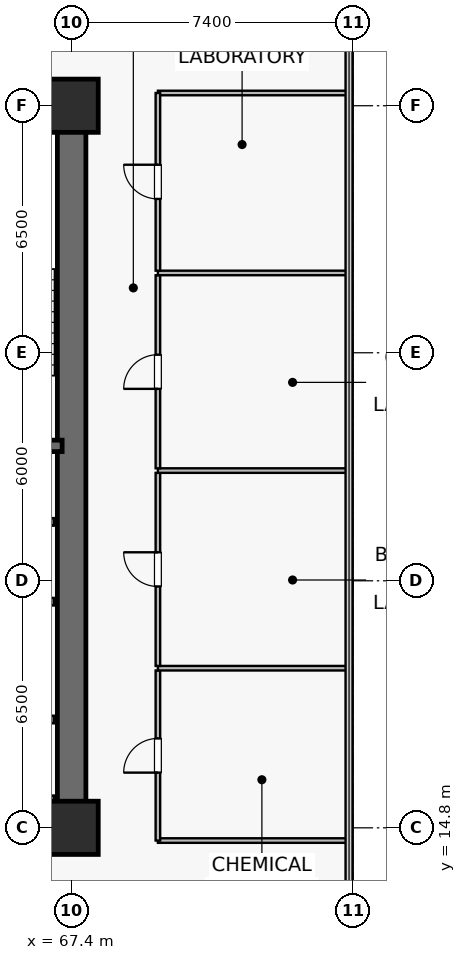
"""IFC4 building model, lengths in metres.
Left out: names, types, materials, properties, quantities, classifications, styles, units other than length and angle.
Written with IfcOpenShell. Run it as: python <this file> out.ifc"""

import sys

from ifc_helpers import new_model, si_unit, direction, frame, frame_2d, origin, origin_2d, place, context, subcontext, project, spatial, rectangle, extrude, source, transform, mapped, element, fill, save


model = new_model("IFC4")
c1 = context("Model", 3, precision=1e-05, world=origin(), true_north=direction((0.0, 1.0)))
c2 = subcontext(c1, "Body", "Model", "MODEL_VIEW")
j1 = project(units=[si_unit("LENGTHUNIT", "METRE"), si_unit("PLANEANGLEUNIT", "RADIAN")], contexts=[c1])
p1 = place(None, origin())
s1 = spatial("IfcSite", under=j1, at=p1, CompositionType="ELEMENT")
p2 = place(p1, origin())
s2 = spatial("IfcBuilding", under=s1, at=p2, CompositionType="ELEMENT")
p3 = place(p2, frame((0.0, 0.0, 62.1)))
s3 = spatial("IfcBuildingStorey", under=s2, at=p3, CompositionType="ELEMENT", Elevation=62.1)
p4 = place(p3, frame((52.225, 14.8, 0.0), z_axis=(0.0, 0.0, 1.0), x_axis=(1.0, 0.0, 0.0)))
e1 = element("IfcWall", 1, at=p4, inside=s3, PredefinedType="SHEAR", context=c2, shape_type="SweptSolid", body=[
    extrude(rectangle(XDim=15.55, YDim=0.75, at=frame_2d((7.775, 0.0))), origin(), (0.0, 0.0, 1.0), 3.78),
])
p5 = place(p3, frame((52.225, 33.8, 0.0), z_axis=(0.0, 0.0, 1.0), x_axis=(1.0, 0.0, 0.0)))
e2 = element("IfcWall", 2, at=p5, inside=s3, PredefinedType="SHEAR", context=c2, shape_type="SweptSolid", body=[
    extrude(rectangle(XDim=15.55, YDim=0.75, at=frame_2d((7.775, 0.0))), origin(), (0.0, 0.0, 1.0), 3.78),
])
p6 = place(p5, frame((8.875, 0.0, 0.0)))
e3 = element("IfcOpeningElement", 3, at=p6, cuts=e2, PredefinedType="OPENING", context=c2, shape_type="SweptSolid", body=[
    extrude(rectangle(XDim=0.95, YDim=2.15, at=frame_2d((0.475, 1.075))), frame((0.0, 0.385, 0.0), z_axis=(0.0, -1.0, 0.0), x_axis=(1.0, 0.0, 0.0)), (0.0, 0.0, 1.0), 0.77),
])
p7 = place(p5, frame((5.51, 0.0, 0.0)))
e4 = element("IfcOpeningElement", 4, at=p7, cuts=e2, PredefinedType="OPENING", context=c2, shape_type="SweptSolid", body=[
    extrude(rectangle(XDim=0.95, YDim=2.15, at=frame_2d((0.475, 1.075))), frame((0.0, 0.385, 0.0), z_axis=(0.0, -1.0, 0.0), x_axis=(1.0, 0.0, 0.0)), (0.0, 0.0, 1.0), 0.77),
])
p8 = place(p5, frame((2.11, 0.0, 0.0)))
e5 = element("IfcOpeningElement", 5, at=p8, cuts=e2, PredefinedType="OPENING", context=c2, shape_type="SweptSolid", body=[
    extrude(rectangle(XDim=0.95, YDim=2.15, at=frame_2d((0.475, 1.075))), frame((0.0, 0.385, 0.0), z_axis=(0.0, -1.0, 0.0), x_axis=(1.0, 0.0, 0.0)), (0.0, 0.0, 1.0), 0.77),
])
p9 = place(p3, frame((67.4, 15.175, 0.0), z_axis=(0.0, 0.0, 1.0), x_axis=(0.0, 1.0, 0.0)))
e6 = element("IfcWall", 6, at=p9, inside=s3, PredefinedType="SHEAR", context=c2, shape_type="SweptSolid", body=[
    extrude(rectangle(XDim=18.25, YDim=0.75, at=frame_2d((9.125, 0.0))), origin(), (0.0, 0.0, 1.0), 3.78),
])
p10 = place(p3, frame((63.35, 24.85, 0.0), z_axis=(0.0, 0.0, 1.0), x_axis=(1.0, 0.0, 0.0)))
e7 = element("IfcWall", 7, at=p10, inside=s3, PredefinedType="SHEAR", context=c2, shape_type="SweptSolid", body=[
    extrude(rectangle(XDim=3.8, YDim=0.3, at=frame_2d((1.9, 0.0))), origin(), (0.0, 0.0, 1.0), 3.78),
])
p11 = place(p3, frame((63.35, 33.4, 0.0), z_axis=(0.0, 0.0, 1.0), x_axis=(1.0, 0.0, 0.0)))
e8 = element("IfcWall", 8, at=p11, inside=s3, PredefinedType="SOLIDWALL", context=c2, shape_type="SweptSolid", body=[
    extrude(rectangle(XDim=3.72, YDim=0.12, at=frame_2d((1.86, 0.0))), origin(), (0.0, 0.0, 1.0), 3.78),
])
m1 = source(origin(), c2, "Body", "SweptSolid", [
    extrude(rectangle(XDim=1.4, YDim=1.4, at=origin_2d()), origin(), (0.0, 0.0, 1.0), 4.1),
])
for number, where, z_axis, x_axis in (
    (9, (67.4, 14.8, 0.0), (0.0, 0.0, 1.0), (1.0, 0.0, 0.0)),
    (10, (67.4, 33.8, 0.0), (0.0, 0.0, 1.0), (1.0, 0.0, 0.0)),
):
    element("IfcColumn", number, at=place(p3, frame(where, z_axis=z_axis, x_axis=x_axis)), inside=s3, PredefinedType="COLUMN", context=c2, shape_type="MappedRepresentation", body=[
        mapped(m1, transform((0.0, 0.0, 0.0), scale=1.0)),
    ])
p12 = place(p3, frame((64.67, 17.65, 0.0), z_axis=(0.0, 0.0, 1.0), x_axis=(1.0, 0.0, 0.0)))
e11 = element("IfcWall", 11, at=p12, inside=s3, PredefinedType="SOLIDWALL", context=c2, shape_type="SweptSolid", body=[
    extrude(rectangle(XDim=2.26, YDim=0.2, at=frame_2d((1.13, 0.0))), origin(), (0.0, 0.0, 1.0), 3.78),
])
p13 = place(p12, frame((0.58, 0.0, 0.0)))
e12 = element("IfcOpeningElement", 12, at=p13, cuts=e11, PredefinedType="OPENING", context=c2, shape_type="SweptSolid", body=[
    extrude(rectangle(XDim=1.1, YDim=2.22, at=frame_2d((0.55, 1.11))), frame((0.0, 0.11, 0.0), z_axis=(0.0, -1.0, 0.0), x_axis=(1.0, 0.0, 0.0)), (0.0, 0.0, 1.0), 0.22),
])
for number, where, z_axis, x_axis in (
    (13, (64.67, 15.55, 0.0), (0.0, 0.0, 1.0), (1.0, 0.0, 0.0)),
    (14, (64.67, 20.75, 0.0), (0.0, 0.0, 1.0), (1.0, 0.0, 0.0)),
    (15, (64.67, 22.85, 0.0), (0.0, 0.0, 1.0), (1.0, 0.0, 0.0)),
):
    element("IfcWall", number, at=place(p3, frame(where, z_axis=z_axis, x_axis=x_axis)), inside=s3, PredefinedType="SOLIDWALL", context=c2, shape_type="SweptSolid", body=[
        extrude(rectangle(XDim=2.26, YDim=0.2, at=frame_2d((1.13, 0.0))), origin(), (0.0, 0.0, 1.0), 3.78),
    ])
for number, where, z_axis, x_axis in (
    (16, (69.67, 14.465, 0.0), (0.0, 0.0, 1.0), (1.0, 0.0, 0.0)),
    (17, (69.67, 34.135, 0.0), (0.0, 0.0, 1.0), (1.0, 0.0, 0.0)),
):
    element("IfcWall", number, at=place(p3, frame(where, z_axis=z_axis, x_axis=x_axis)), inside=s3, PredefinedType="PARTITIONING", context=c2, shape_type="SweptSolid", body=[
        extrude(rectangle(XDim=5.02, YDim=0.12, at=frame_2d((2.51, 0.0))), origin(), (0.0, 0.0, 1.0), 3.78),
    ])
p14 = place(p3, frame((69.67, 14.465, 0.0), z_axis=(0.0, 0.0, 1.0), x_axis=(0.0, 1.0, 0.0)))
e18 = element("IfcWall", 18, at=p14, inside=s3, PredefinedType="PARTITIONING", context=c2, shape_type="SweptSolid", body=[
    extrude(rectangle(XDim=4.475, YDim=0.12, at=frame_2d((2.237, 0.0))), origin(), (0.0, 0.0, 1.0), 3.78),
])
p15 = place(p14, frame((1.788, 0.0, 0.0)))
e19 = element("IfcOpeningElement", 19, at=p15, cuts=e18, PredefinedType="OPENING", context=c2, shape_type="SweptSolid", body=[
    extrude(rectangle(XDim=0.9, YDim=2.1, at=frame_2d((0.45, 1.05))), frame((0.0, 0.07, 0.0), z_axis=(0.0, -1.0, 0.0), x_axis=(1.0, 0.0, 0.0)), (0.0, 0.0, 1.0), 0.14),
])
p16 = place(p3, frame((69.67, 19.0, 0.0), z_axis=(0.0, 0.0, 1.0), x_axis=(1.0, 0.0, 0.0)))
e20 = element("IfcWall", 20, at=p16, inside=s3, PredefinedType="PARTITIONING", context=c2, shape_type="SweptSolid", body=[
    extrude(rectangle(XDim=5.02, YDim=0.12, at=frame_2d((2.51, 0.0))), origin(), (0.0, 0.0, 1.0), 3.78),
])
p17 = place(p3, frame((69.67, 19.06, 0.0), z_axis=(0.0, 0.0, 1.0), x_axis=(0.0, 1.0, 0.0)))
e21 = element("IfcWall", 21, at=p17, inside=s3, PredefinedType="PARTITIONING", context=c2, shape_type="SweptSolid", body=[
    extrude(rectangle(XDim=5.08, YDim=0.12, at=frame_2d((2.54, 0.0))), origin(), (0.0, 0.0, 1.0), 3.78),
])
p18 = place(p17, frame((2.09, 0.0, 0.0)))
e22 = element("IfcOpeningElement", 22, at=p18, cuts=e21, PredefinedType="OPENING", context=c2, shape_type="SweptSolid", body=[
    extrude(rectangle(XDim=0.9, YDim=2.1, at=frame_2d((0.45, 1.05))), frame((0.0, 0.07, 0.0), z_axis=(0.0, -1.0, 0.0), x_axis=(1.0, 0.0, 0.0)), (0.0, 0.0, 1.0), 0.14),
])
p19 = place(p3, frame((69.67, 24.2, 0.0), z_axis=(0.0, 0.0, 1.0), x_axis=(1.0, 0.0, 0.0)))
e23 = element("IfcWall", 23, at=p19, inside=s3, PredefinedType="PARTITIONING", context=c2, shape_type="SweptSolid", body=[
    extrude(rectangle(XDim=5.02, YDim=0.12, at=frame_2d((2.51, 0.0))), origin(), (0.0, 0.0, 1.0), 3.78),
])
p20 = place(p3, frame((69.67, 24.26, 0.0), z_axis=(0.0, 0.0, 1.0), x_axis=(0.0, 1.0, 0.0)))
e24 = element("IfcWall", 24, at=p20, inside=s3, PredefinedType="PARTITIONING", context=c2, shape_type="SweptSolid", body=[
    extrude(rectangle(XDim=5.08, YDim=0.12, at=frame_2d((2.54, 0.0))), origin(), (0.0, 0.0, 1.0), 3.78),
])
p21 = place(p20, frame((2.09, 0.0, 0.0)))
e25 = element("IfcOpeningElement", 25, at=p21, cuts=e24, PredefinedType="OPENING", context=c2, shape_type="SweptSolid", body=[
    extrude(rectangle(XDim=0.9, YDim=2.1, at=frame_2d((0.45, 1.05))), frame((0.0, 0.07, 0.0), z_axis=(0.0, -1.0, 0.0), x_axis=(1.0, 0.0, 0.0)), (0.0, 0.0, 1.0), 0.14),
])
p22 = place(p3, frame((69.67, 29.4, 0.0), z_axis=(0.0, 0.0, 1.0), x_axis=(1.0, 0.0, 0.0)))
e26 = element("IfcWall", 26, at=p22, inside=s3, PredefinedType="PARTITIONING", context=c2, shape_type="SweptSolid", body=[
    extrude(rectangle(XDim=5.02, YDim=0.12, at=frame_2d((2.51, 0.0))), origin(), (0.0, 0.0, 1.0), 3.78),
])
p23 = place(p3, frame((69.67, 29.46, 0.0), z_axis=(0.0, 0.0, 1.0), x_axis=(0.0, 1.0, 0.0)))
e27 = element("IfcWall", 27, at=p23, inside=s3, PredefinedType="PARTITIONING", context=c2, shape_type="SweptSolid", body=[
    extrude(rectangle(XDim=4.675, YDim=0.12, at=frame_2d((2.337, 0.0))), origin(), (0.0, 0.0, 1.0), 3.78),
])
p24 = place(p23, frame((1.887, 0.0, 0.0)))
e28 = element("IfcOpeningElement", 28, at=p24, cuts=e27, PredefinedType="OPENING", context=c2, shape_type="SweptSolid", body=[
    extrude(rectangle(XDim=0.9, YDim=2.1, at=frame_2d((0.45, 1.05))), frame((0.0, 0.07, 0.0), z_axis=(0.0, -1.0, 0.0), x_axis=(1.0, 0.0, 0.0)), (0.0, 0.0, 1.0), 0.14),
])
m2 = source(origin(), c2, "Body", "SweptSolid", [
    extrude(rectangle(XDim=0.9, YDim=2.1, at=frame_2d((0.45, 1.05))), frame((0.0, 0.025, 0.0), z_axis=(0.0, -1.0, 0.0), x_axis=(1.0, 0.0, 0.0)), (0.0, 0.0, 1.0), 0.05),
])
p25 = place(p15, origin())
e29 = element("IfcDoor", 29, at=p25, inside=s3, OperationType="SINGLE_SWING_LEFT", PredefinedType="DOOR", context=c2, shape_type="MappedRepresentation", body=[
    mapped(m2, transform((0.0, 0.0, 0.0), scale=1.0)),
])
fill(e19, e29)
p26 = place(p18, origin())
e30 = element("IfcDoor", 30, at=p26, inside=s3, OperationType="SINGLE_SWING_RIGHT", PredefinedType="DOOR", context=c2, shape_type="MappedRepresentation", body=[
    mapped(m2, transform((0.0, 0.0, 0.0), scale=1.0)),
])
fill(e22, e30)
p27 = place(p21, origin())
e31 = element("IfcDoor", 31, at=p27, inside=s3, OperationType="SINGLE_SWING_LEFT", PredefinedType="DOOR", context=c2, shape_type="MappedRepresentation", body=[
    mapped(m2, transform((0.0, 0.0, 0.0), scale=1.0)),
])
fill(e25, e31)
p28 = place(p24, origin())
e32 = element("IfcDoor", 32, at=p28, inside=s3, OperationType="SINGLE_SWING_RIGHT", PredefinedType="DOOR", context=c2, shape_type="MappedRepresentation", body=[
    mapped(m2, transform((0.0, 0.0, 0.0), scale=1.0)),
])
fill(e28, e32)
save(model, sys.argv[1])
